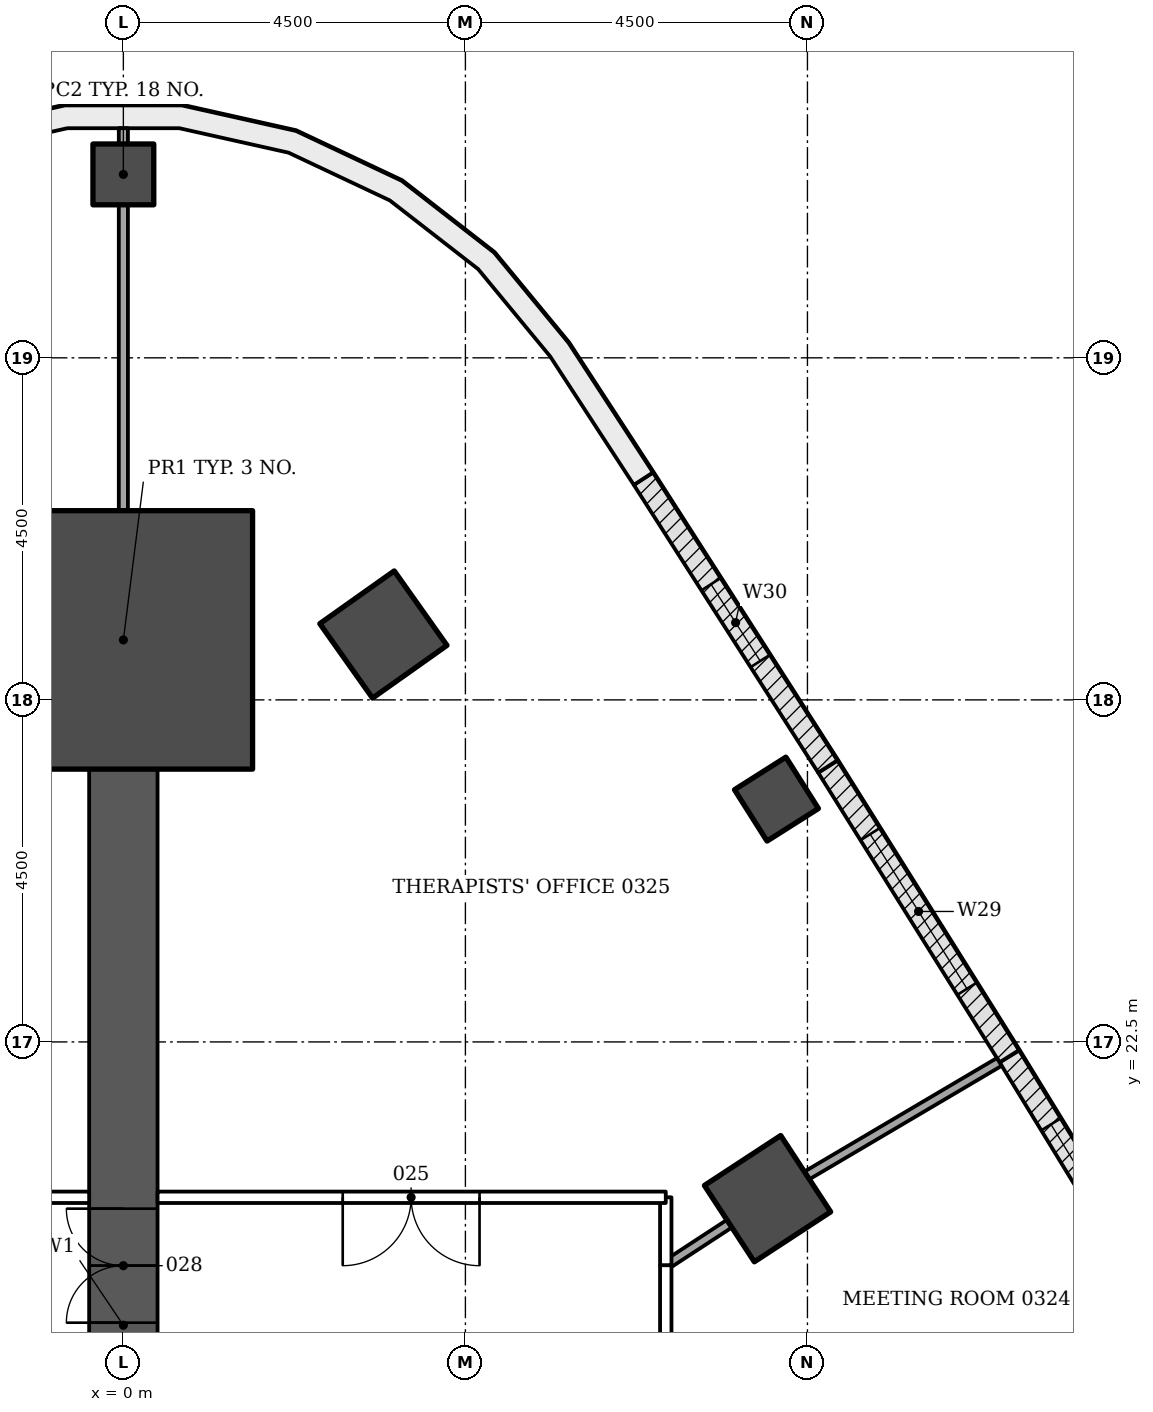
"""IFC4 building model, lengths in metres.
Left out: names, types, materials, properties, quantities, classifications, styles, units other than length and angle.
Written with IfcOpenShell. Run it as: python <this file> out.ifc"""

import sys

from ifc_helpers import new_model, si_unit, direction, frame, frame_2d, origin, origin_2d, place, context, subcontext, project, spatial, polyline, rectangle, outline, extrude, element, fill, save


model = new_model("IFC4")
c1 = context("Model", 3, precision=1e-05, world=origin(), true_north=direction((0.0, 1.0)))
c2 = subcontext(c1, "Body", "Model", "MODEL_VIEW")
j1 = project(units=[si_unit("LENGTHUNIT", "METRE"), si_unit("PLANEANGLEUNIT", "RADIAN")], contexts=[c1])
p1 = place(None, origin())
s1 = spatial("IfcSite", under=j1, at=p1, CompositionType="ELEMENT")
p2 = place(p1, origin())
s2 = spatial("IfcBuilding", under=s1, at=p2, CompositionType="ELEMENT")
p3 = place(p2, frame((0.0, 0.0, 15.0)))
s3 = spatial("IfcBuildingStorey", under=s2, at=p3, CompositionType="ELEMENT", Elevation=15.0)
for number, where, z_axis, x_axis in (
    (1, (8.475, 20.438, -0.25), (0.0, 0.0, 1.0), (0.837, 0.547, 0.0)),
    (2, (3.421, 27.86, -0.25), (0.0, 0.0, 1.0), (0.816, 0.578, 0.0)),
):
    element("IfcColumn", number, at=place(p3, frame(where, z_axis=z_axis, x_axis=x_axis)), inside=s3, PredefinedType="COLUMN", context=c2, shape_type="SweptSolid", body=[
        extrude(rectangle(XDim=1.2, YDim=1.2, at=origin_2d()), origin(), (0.0, 0.0, 1.0), 4.5),
    ])
for number, where, z_axis, x_axis in (
    (3, (0.0, 33.913, -0.25), (0.0, 0.0, 1.0), (0.0, 1.0, 0.0)),
    (4, (8.592, 25.695, -0.25), (0.0, 0.0, 1.0), (0.845, 0.535, 0.0)),
):
    element("IfcColumn", number, at=place(p3, frame(where, z_axis=z_axis, x_axis=x_axis)), inside=s3, PredefinedType="COLUMN", context=c2, shape_type="SweptSolid", body=[
        extrude(rectangle(XDim=0.8, YDim=0.8, at=origin_2d()), origin(), (0.0, 0.0, 1.0), 4.5),
    ])
p4 = place(p3, frame((0.0, 11.456, -0.25), z_axis=(0.0, 0.0, 1.0), x_axis=(0.0, 1.0, 0.0)))
e5 = element("IfcWall", 5, at=p4, inside=s3, PredefinedType="SHEAR", context=c2, shape_type="SweptSolid", body=[
    extrude(rectangle(XDim=14.633, YDim=0.9, at=frame_2d((7.316, 0.0))), origin(), (0.0, 0.0, 1.0), 4.5),
])
p5 = place(p4, frame((7.35, 0.0, 0.25)))
e6 = element("IfcOpeningElement", 6, at=p5, cuts=e5, PredefinedType="OPENING", context=c2, shape_type="SweptSolid", body=[
    extrude(rectangle(XDim=1.5, YDim=2.1, at=frame_2d((0.75, 1.05))), frame((0.0, 0.46, 0.0), z_axis=(0.0, -1.0, 0.0), x_axis=(1.0, 0.0, 0.0)), (0.0, 0.0, 1.0), 0.92),
])
p6 = place(p3, frame((0.0, 27.789, -0.25), z_axis=(0.0, 0.0, 1.0), x_axis=(0.0, 1.0, 0.0)))
e7 = element("IfcColumn", 7, at=p6, inside=s3, PredefinedType="COLUMN", context=c2, shape_type="SweptSolid", body=[
    extrude(rectangle(XDim=3.4, YDim=3.4, at=origin_2d()), origin(), (0.0, 0.0, 1.0), 4.5),
])
p7 = place(p3, frame((11.656, 22.309, 0.0), z_axis=(0.0, 0.0, 1.0), x_axis=(0.522078085402, -0.852897691838, 0.0)))
e8 = element("IfcWall", 8, at=p7, inside=s3, PredefinedType="NOTDEFINED", context=c2, shape_type="SweptSolid", body=[
    extrude(rectangle(XDim=4.496, YDim=0.3, at=frame_2d((2.248, 0.0))), origin(), (0.0, 0.0, 1.0), 4.25),
])
p8 = place(p7, frame((1.048, 0.0, 0.9)))
e9 = element("IfcOpeningElement", 9, at=p8, cuts=e8, PredefinedType="OPENING", context=c2, shape_type="SweptSolid", body=[
    extrude(rectangle(XDim=2.4, YDim=2.4, at=frame_2d((1.2, 1.2))), frame((0.0, 0.16, 0.0), z_axis=(0.0, -1.0, 0.0), x_axis=(1.0, 0.0, 0.0)), (0.0, 0.0, 1.0), 0.32),
])
p9 = place(p3, frame((9.269, 26.122, 0.0), z_axis=(0.0, 0.0, 1.0), x_axis=(0.530804082031, -0.847494558389, 0.0)))
e10 = element("IfcWall", 10, at=p9, inside=s3, PredefinedType="NOTDEFINED", context=c2, shape_type="SweptSolid", body=[
    extrude(rectangle(XDim=4.496, YDim=0.3, at=frame_2d((2.248, 0.0))), origin(), (0.0, 0.0, 1.0), 4.25),
])
p10 = place(p9, frame((1.048, 0.0, 0.9)))
e11 = element("IfcOpeningElement", 11, at=p10, cuts=e10, PredefinedType="OPENING", context=c2, shape_type="SweptSolid", body=[
    extrude(rectangle(XDim=2.4, YDim=2.4, at=frame_2d((1.2, 1.2))), frame((0.0, 0.16, 0.0), z_axis=(0.0, -1.0, 0.0), x_axis=(1.0, 0.0, 0.0)), (0.0, 0.0, 1.0), 0.32),
])
p11 = place(p3, frame((6.842, 29.909, 0.0), z_axis=(0.0, 0.0, 1.0), x_axis=(0.539483537275, -0.841996147859, 0.0)))
e12 = element("IfcWall", 12, at=p11, inside=s3, PredefinedType="NOTDEFINED", context=c2, shape_type="SweptSolid", body=[
    extrude(rectangle(XDim=4.496, YDim=0.3, at=frame_2d((2.248, 0.0))), origin(), (0.0, 0.0, 1.0), 4.25),
])
p12 = place(p11, frame((1.648, 0.0, 0.8)))
e13 = element("IfcOpeningElement", 13, at=p12, cuts=e12, PredefinedType="OPENING", context=c2, shape_type="SweptSolid", body=[
    extrude(rectangle(XDim=1.2, YDim=3.0, at=frame_2d((0.6, 1.5))), frame((0.0, 0.16, 0.0), z_axis=(0.0, -1.0, 0.0), x_axis=(1.0, 0.0, 0.0)), (0.0, 0.0, 1.0), 0.32),
])
p13 = place(p3, origin())
e14 = element("IfcWall", 14, at=p13, inside=s3, PredefinedType="NOTDEFINED", context=c2, shape_type="SweptSolid", body=[
    extrude(outline(polyline([(6.967, 29.992), (5.857, 31.697), (4.878, 32.884), (3.663, 33.828), (2.271, 34.485), (0.769, 34.821), (-0.769, 34.821), (-2.271, 34.485), (-3.663, 33.828), (-4.878, 32.884), (-5.857, 31.697), (-6.967, 29.992), (-6.716, 29.828), (-5.615, 31.519), (-4.667, 32.667), (-3.505, 33.571), (-2.173, 34.199), (-0.736, 34.521), (0.736, 34.521), (2.173, 34.199), (3.505, 33.571), (4.667, 32.667), (5.615, 31.519), (6.716, 29.828), (6.967, 29.992)])), origin(), (0.0, 0.0, 1.0), 4.25),
])
p14 = place(p3, frame((7.136, 16.096, 0.0), z_axis=(0.0, 0.0, 1.0), x_axis=(0.0, 1.0, 0.0)))
e15 = element("IfcWall", 15, at=p14, inside=s3, PredefinedType="PARTITIONING", context=c2, shape_type="SweptSolid", body=[
    extrude(rectangle(XDim=3.467, YDim=0.15, at=frame_2d((1.733, 0.0))), origin(), (0.0, 0.0, 1.0), 3.638),
])
p15 = place(p14, frame((1.25, 0.0, 0.0)))
e16 = element("IfcOpeningElement", 16, at=p15, cuts=e15, PredefinedType="OPENING", context=c2, shape_type="SweptSolid", body=[
    extrude(rectangle(XDim=1.0, YDim=2.1, at=frame_2d((0.5, 1.05))), frame((0.0, 0.085, 0.0), z_axis=(0.0, -1.0, 0.0), x_axis=(1.0, 0.0, 0.0)), (0.0, 0.0, 1.0), 0.17),
])
p16 = place(p3, frame((7.136, 19.563, 0.0), z_axis=(0.0, 0.0, 1.0), x_axis=(0.0, 1.0, 0.0)))
e17 = element("IfcWall", 17, at=p16, inside=s3, PredefinedType="PARTITIONING", context=c2, shape_type="SweptSolid", body=[
    extrude(rectangle(XDim=0.893, YDim=0.15, at=frame_2d((0.447, 0.0))), origin(), (0.0, 0.0, 1.0), 3.638),
])
p17 = place(p3, frame((7.136, 20.456, 0.0), z_axis=(0.0, 0.0, 1.0), x_axis=(-1.0, 0.0, 0.0)))
e18 = element("IfcWall", 18, at=p17, inside=s3, PredefinedType="PARTITIONING", context=c2, shape_type="SweptSolid", body=[
    extrude(rectangle(XDim=6.686, YDim=0.15, at=frame_2d((3.343, 0.0))), origin(), (0.0, 0.0, 1.0), 3.638),
])
p18 = place(p17, frame((2.45, 0.0, 0.0)))
e19 = element("IfcOpeningElement", 19, at=p18, cuts=e18, PredefinedType="OPENING", context=c2, shape_type="SweptSolid", body=[
    extrude(rectangle(XDim=1.8, YDim=2.1, at=frame_2d((0.9, 1.05))), frame((0.0, 0.085, 0.0), z_axis=(0.0, -1.0, 0.0), x_axis=(1.0, 0.0, 0.0)), (0.0, 0.0, 1.0), 0.17),
])
p19 = place(p3, frame((-0.45, 20.456, 0.0), z_axis=(0.0, 0.0, 1.0), x_axis=(-1.0, 0.0, 0.0)))
e20 = element("IfcWall", 20, at=p19, inside=s3, PredefinedType="PARTITIONING", context=c2, shape_type="SweptSolid", body=[
    extrude(rectangle(XDim=1.8, YDim=0.15, at=frame_2d((0.9, 0.0))), origin(), (0.0, 0.0, 1.0), 3.638),
])
p20 = place(p3, frame((7.973, 20.109, 0.0), z_axis=(0.0, 0.0, 1.0), x_axis=(-0.836986858992, -0.547222987341, 0.0)))
e21 = element("IfcWall", 21, at=p20, inside=s3, PredefinedType="PARTITIONING", context=c2, shape_type="SweptSolid", body=[
    extrude(rectangle(XDim=0.998, YDim=0.12, at=frame_2d((0.499, 0.0))), origin(), (0.0, 0.0, 1.0), 3.638),
])
p21 = place(p3, frame((11.524, 22.237, 0.0), z_axis=(0.0, 0.0, 1.0), x_axis=(-0.861228913487, -0.508217235613, 0.0)))
e22 = element("IfcWall", 22, at=p21, inside=s3, PredefinedType="PARTITIONING", context=c2, shape_type="SweptSolid", body=[
    extrude(rectangle(XDim=2.94, YDim=0.12, at=frame_2d((1.47, 0.0))), origin(), (0.0, 0.0, 1.0), 3.633),
])
p22 = place(p3, frame((0.0, 29.489, 0.0), z_axis=(0.0, 0.0, 1.0), x_axis=(0.0, 1.0, 0.0)))
e23 = element("IfcWall", 23, at=p22, inside=s3, PredefinedType="PARTITIONING", context=c2, shape_type="SweptSolid", body=[
    extrude(rectangle(XDim=4.024, YDim=0.12, at=frame_2d((2.012, 0.0))), origin(), (0.0, 0.0, 1.0), 3.717),
])
p23 = place(p3, frame((0.0, 34.313, 0.0), z_axis=(0.0, 0.0, 1.0), x_axis=(0.0, 1.0, 0.0)))
e24 = element("IfcWall", 24, at=p23, inside=s3, PredefinedType="PARTITIONING", context=c2, shape_type="SweptSolid", body=[
    extrude(rectangle(XDim=0.208, YDim=0.12, at=frame_2d((0.104, 0.0))), origin(), (0.0, 0.0, 1.0), 4.25),
])
p24 = place(p8, origin())
e25 = element("IfcWindow", 25, at=p24, inside=s3, PartitioningType="DOUBLE_PANEL_VERTICAL", PredefinedType="WINDOW", context=c2, shape_type="SweptSolid", body=[
    extrude(rectangle(XDim=2.4, YDim=2.4, at=frame_2d((1.2, 1.2))), frame((0.0, 0.03, 0.0), z_axis=(0.0, -1.0, 0.0), x_axis=(1.0, 0.0, 0.0)), (0.0, 0.0, 1.0), 0.06),
])
fill(e9, e25)
p25 = place(p10, origin())
e26 = element("IfcWindow", 26, at=p25, inside=s3, PartitioningType="DOUBLE_PANEL_VERTICAL", PredefinedType="WINDOW", context=c2, shape_type="SweptSolid", body=[
    extrude(rectangle(XDim=2.4, YDim=2.4, at=frame_2d((1.2, 1.2))), frame((0.0, 0.03, 0.0), z_axis=(0.0, -1.0, 0.0), x_axis=(1.0, 0.0, 0.0)), (0.0, 0.0, 1.0), 0.06),
])
fill(e11, e26)
p26 = place(p12, origin())
e27 = element("IfcWindow", 27, at=p26, inside=s3, PartitioningType="SINGLE_PANEL", PredefinedType="WINDOW", context=c2, shape_type="SweptSolid", body=[
    extrude(rectangle(XDim=1.2, YDim=3.0, at=frame_2d((0.6, 1.5))), frame((0.0, 0.03, 0.0), z_axis=(0.0, -1.0, 0.0), x_axis=(1.0, 0.0, 0.0)), (0.0, 0.0, 1.0), 0.06),
])
fill(e13, e27)
p27 = place(p18, origin())
e28 = element("IfcDoor", 28, at=p27, inside=s3, OperationType="DOUBLE_DOOR_SINGLE_SWING", PredefinedType="DOOR", context=c2, shape_type="SweptSolid", body=[
    extrude(rectangle(XDim=1.8, YDim=2.1, at=frame_2d((0.9, 1.05))), frame((0.0, 0.025, 0.0), z_axis=(0.0, -1.0, 0.0), x_axis=(1.0, 0.0, 0.0)), (0.0, 0.0, 1.0), 0.05),
])
fill(e19, e28)
p28 = place(p5, origin())
e29 = element("IfcDoor", 29, at=p28, inside=s3, OperationType="DOUBLE_DOOR_SINGLE_SWING", PredefinedType="DOOR", context=c2, shape_type="SweptSolid", body=[
    extrude(rectangle(XDim=1.5, YDim=2.1, at=frame_2d((0.75, 1.05))), frame((0.0, 0.025, 0.0), z_axis=(0.0, -1.0, 0.0), x_axis=(1.0, 0.0, 0.0)), (0.0, 0.0, 1.0), 0.05),
])
fill(e6, e29)
save(model, sys.argv[1])
